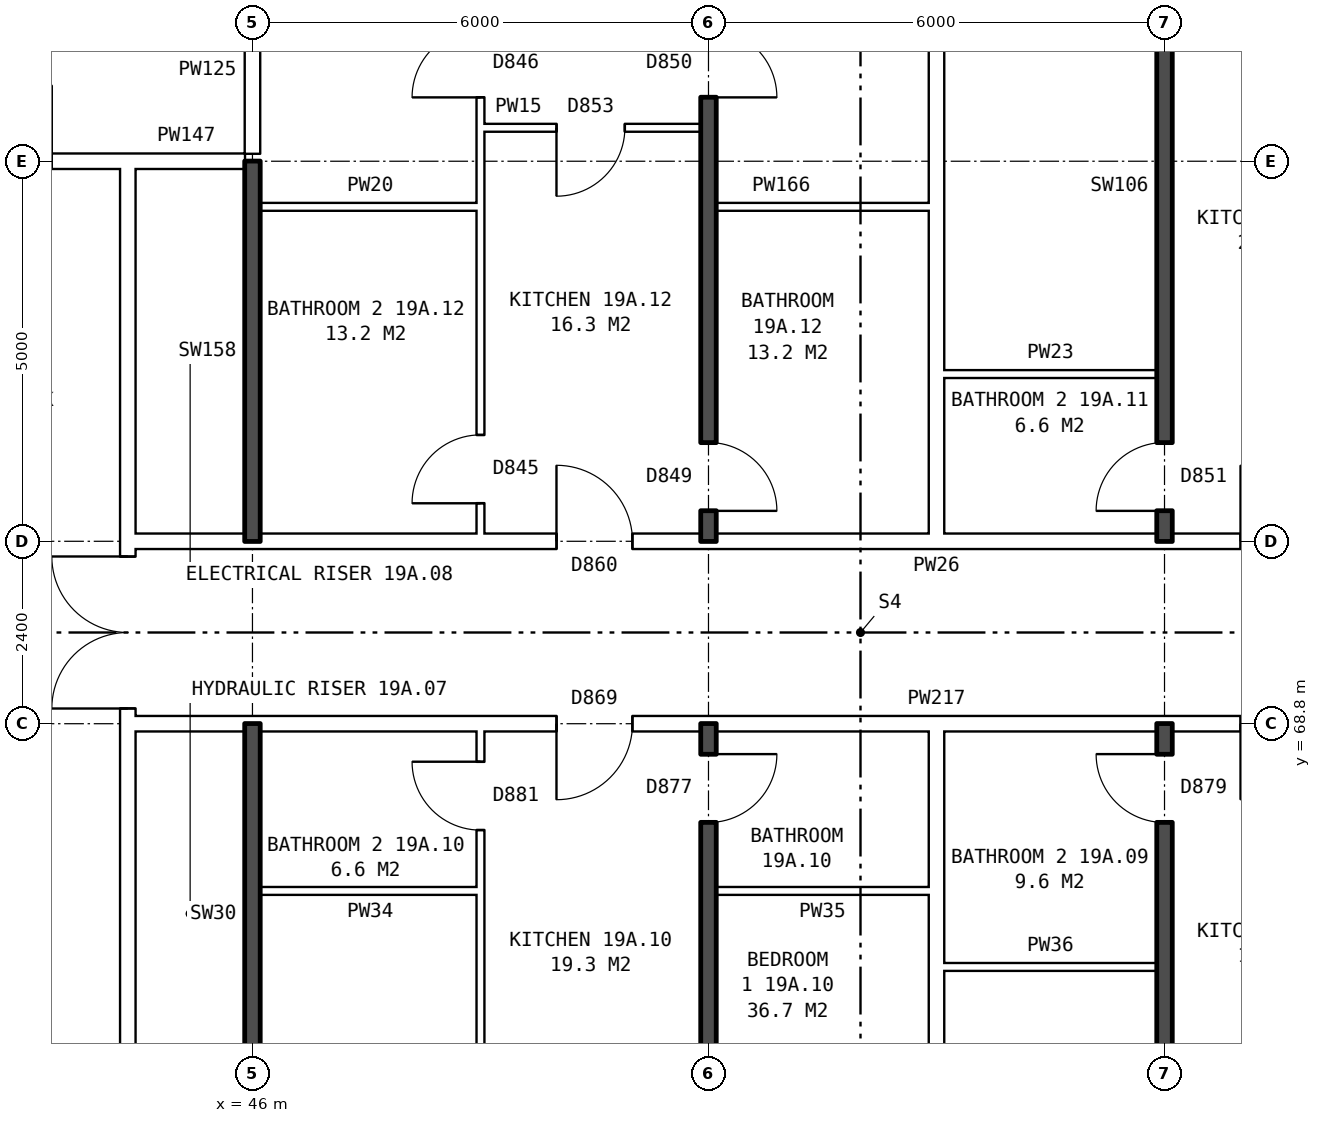
"""IFC4 building model, lengths in metres.
Left out: names, types, materials, properties, quantities, classifications, styles, units other than length and angle.
Written with IfcOpenShell. Run it as: python <this file> out.ifc"""

import sys

from ifc_helpers import new_model, si_unit, direction, frame, frame_2d, origin, place, context, subcontext, project, spatial, rectangle, extrude, element, fill, save


model = new_model("IFC4")
c1 = context("Model", 3, precision=1e-05, world=origin(), true_north=direction((0.0, 1.0)))
c2 = subcontext(c1, "Body", "Model", "MODEL_VIEW")
j1 = project(units=[si_unit("LENGTHUNIT", "METRE"), si_unit("PLANEANGLEUNIT", "RADIAN")], contexts=[c1])
p1 = place(None, origin())
s1 = spatial("IfcSite", under=j1, at=p1, CompositionType="ELEMENT")
p2 = place(p1, origin())
s2 = spatial("IfcBuilding", under=s1, at=p2, CompositionType="ELEMENT")
p3 = place(p2, frame((0.0, 0.0, 71.6)))
s3 = spatial("IfcBuildingStorey", under=s2, at=p3, CompositionType="ELEMENT", Elevation=71.6)
p4 = place(p3, frame((44.36, 63.9, 0.0), z_axis=(0.0, 0.0, 1.0), x_axis=(0.0, 1.0, 0.0)))
e1 = element("IfcWall", 1, at=p4, inside=s3, PredefinedType="PARTITIONING", context=c2, shape_type="SweptSolid", body=[
    extrude(rectangle(XDim=12.2, YDim=0.2, at=frame_2d((6.1, 0.0))), origin(), (0.0, 0.0, 1.0), 2.85),
])
p5 = place(p4, frame((5.1, 0.0, 0.0)))
e2 = element("IfcOpeningElement", 2, at=p5, cuts=e1, PredefinedType="OPENING", context=c2, shape_type="SweptSolid", body=[
    extrude(rectangle(XDim=2.0, YDim=2.1, at=frame_2d((1.0, 1.05))), frame((0.0, 0.11, 0.0), z_axis=(0.0, -1.0, 0.0), x_axis=(1.0, 0.0, 0.0)), (0.0, 0.0, 1.0), 0.22),
])
p6 = place(p3, frame((55.1, 65.6, 0.0), z_axis=(0.0, 0.0, 1.0), x_axis=(1.0, 0.0, 0.0)))
e3 = element("IfcWall", 3, at=p6, inside=s3, PredefinedType="PARTITIONING", context=c2, shape_type="SweptSolid", body=[
    extrude(rectangle(XDim=2.8, YDim=0.1, at=frame_2d((1.4, 0.0))), origin(), (0.0, 0.0, 1.0), 2.85),
])
p7 = place(p3, frame((46.1, 66.6, 0.0), z_axis=(0.0, 0.0, 1.0), x_axis=(1.0, 0.0, 0.0)))
e4 = element("IfcWall", 4, at=p7, inside=s3, PredefinedType="PARTITIONING", context=c2, shape_type="SweptSolid", body=[
    extrude(rectangle(XDim=2.9, YDim=0.1, at=frame_2d((1.45, 0.0))), origin(), (0.0, 0.0, 1.0), 2.85),
])
p8 = place(p3, frame((52.1, 66.6, 0.0), z_axis=(0.0, 0.0, 1.0), x_axis=(1.0, 0.0, 0.0)))
e5 = element("IfcWall", 5, at=p8, inside=s3, PredefinedType="PARTITIONING", context=c2, shape_type="SweptSolid", body=[
    extrude(rectangle(XDim=2.8, YDim=0.1, at=frame_2d((1.4, 0.0))), origin(), (0.0, 0.0, 1.0), 2.85),
])
p9 = place(p3, frame((44.36, 68.8, 0.0), z_axis=(0.0, 0.0, 1.0), x_axis=(1.0, 0.0, 0.0)))
e6 = element("IfcWall", 6, at=p9, inside=s3, PredefinedType="PARTITIONING", context=c2, shape_type="SweptSolid", body=[
    extrude(rectangle(XDim=19.28, YDim=0.2, at=frame_2d((9.64, 0.0))), origin(), (0.0, 0.0, 1.0), 2.85),
])
p10 = place(p9, frame((14.64, 0.0, 0.0)))
e7 = element("IfcOpeningElement", 7, at=p10, cuts=e6, PredefinedType="OPENING", context=c2, shape_type="SweptSolid", body=[
    extrude(rectangle(XDim=1.0, YDim=2.1, at=frame_2d((0.5, 1.05))), frame((0.0, 0.11, 0.0), z_axis=(0.0, -1.0, 0.0), x_axis=(1.0, 0.0, 0.0)), (0.0, 0.0, 1.0), 0.22),
])
p11 = place(p9, frame((5.64, 0.0, 0.0)))
e8 = element("IfcOpeningElement", 8, at=p11, cuts=e6, PredefinedType="OPENING", context=c2, shape_type="SweptSolid", body=[
    extrude(rectangle(XDim=1.0, YDim=2.1, at=frame_2d((0.5, 1.05))), frame((0.0, 0.11, 0.0), z_axis=(0.0, -1.0, 0.0), x_axis=(1.0, 0.0, 0.0)), (0.0, 0.0, 1.0), 0.22),
])
p12 = place(p3, frame((44.36, 71.2, 0.0), z_axis=(0.0, 0.0, 1.0), x_axis=(1.0, 0.0, 0.0)))
e9 = element("IfcWall", 9, at=p12, inside=s3, PredefinedType="PARTITIONING", context=c2, shape_type="SweptSolid", body=[
    extrude(rectangle(XDim=19.28, YDim=0.2, at=frame_2d((9.64, 0.0))), origin(), (0.0, 0.0, 1.0), 2.85),
])
p13 = place(p12, frame((14.64, 0.0, 0.0)))
e10 = element("IfcOpeningElement", 10, at=p13, cuts=e9, PredefinedType="OPENING", context=c2, shape_type="SweptSolid", body=[
    extrude(rectangle(XDim=1.0, YDim=2.1, at=frame_2d((0.5, 1.05))), frame((0.0, 0.11, 0.0), z_axis=(0.0, -1.0, 0.0), x_axis=(1.0, 0.0, 0.0)), (0.0, 0.0, 1.0), 0.22),
])
p14 = place(p12, frame((5.64, 0.0, 0.0)))
e11 = element("IfcOpeningElement", 11, at=p14, cuts=e9, PredefinedType="OPENING", context=c2, shape_type="SweptSolid", body=[
    extrude(rectangle(XDim=1.0, YDim=2.1, at=frame_2d((0.5, 1.05))), frame((0.0, 0.11, 0.0), z_axis=(0.0, -1.0, 0.0), x_axis=(1.0, 0.0, 0.0)), (0.0, 0.0, 1.0), 0.22),
])
p15 = place(p3, frame((55.1, 73.4, 0.0), z_axis=(0.0, 0.0, 1.0), x_axis=(1.0, 0.0, 0.0)))
e12 = element("IfcWall", 12, at=p15, inside=s3, PredefinedType="PARTITIONING", context=c2, shape_type="SweptSolid", body=[
    extrude(rectangle(XDim=2.8, YDim=0.1, at=frame_2d((1.4, 0.0))), origin(), (0.0, 0.0, 1.0), 2.85),
])
p16 = place(p3, frame((46.1, 75.6, 0.0), z_axis=(0.0, 0.0, 1.0), x_axis=(1.0, 0.0, 0.0)))
e13 = element("IfcWall", 13, at=p16, inside=s3, PredefinedType="PARTITIONING", context=c2, shape_type="SweptSolid", body=[
    extrude(rectangle(XDim=2.9, YDim=0.1, at=frame_2d((1.45, 0.0))), origin(), (0.0, 0.0, 1.0), 2.85),
])
p17 = place(p3, frame((52.1, 75.6, 0.0), z_axis=(0.0, 0.0, 1.0), x_axis=(1.0, 0.0, 0.0)))
e14 = element("IfcWall", 14, at=p17, inside=s3, PredefinedType="PARTITIONING", context=c2, shape_type="SweptSolid", body=[
    extrude(rectangle(XDim=2.8, YDim=0.1, at=frame_2d((1.4, 0.0))), origin(), (0.0, 0.0, 1.0), 2.85),
])
p18 = place(p3, frame((41.36, 76.2, 0.0), z_axis=(0.0, 0.0, 1.0), x_axis=(1.0, 0.0, 0.0)))
e15 = element("IfcWall", 15, at=p18, inside=s3, PredefinedType="PARTITIONING", context=c2, shape_type="SweptSolid", body=[
    extrude(rectangle(XDim=3.0, YDim=0.2, at=frame_2d((1.5, 0.0))), origin(), (0.0, 0.0, 1.0), 2.85),
])
p19 = place(p18, frame((1.0, 0.0, 0.0)))
e16 = element("IfcOpeningElement", 16, at=p19, cuts=e15, PredefinedType="OPENING", context=c2, shape_type="SweptSolid", body=[
    extrude(rectangle(XDim=1.0, YDim=2.1, at=frame_2d((0.5, 1.05))), frame((0.0, 0.11, 0.0), z_axis=(0.0, -1.0, 0.0), x_axis=(1.0, 0.0, 0.0)), (0.0, 0.0, 1.0), 0.22),
])
p20 = place(p3, frame((44.36, 76.2, 0.0), z_axis=(0.0, 0.0, 1.0), x_axis=(1.0, 0.0, 0.0)))
e17 = element("IfcWall", 17, at=p20, inside=s3, PredefinedType="PARTITIONING", context=c2, shape_type="SweptSolid", body=[
    extrude(rectangle(XDim=1.54, YDim=0.2, at=frame_2d((0.77, 0.0))), origin(), (0.0, 0.0, 1.0), 2.85),
])
p21 = place(p3, frame((49.0, 76.64, 0.0), z_axis=(0.0, 0.0, 1.0), x_axis=(1.0, 0.0, 0.0)))
e18 = element("IfcWall", 18, at=p21, inside=s3, PredefinedType="PARTITIONING", context=c2, shape_type="SweptSolid", body=[
    extrude(rectangle(XDim=2.9, YDim=0.1, at=frame_2d((1.45, 0.0))), origin(), (0.0, 0.0, 1.0), 2.85),
])
p22 = place(p21, frame((1.0, 0.0, 0.0)))
e19 = element("IfcOpeningElement", 19, at=p22, cuts=e18, PredefinedType="OPENING", context=c2, shape_type="SweptSolid", body=[
    extrude(rectangle(XDim=0.9, YDim=2.1, at=frame_2d((0.45, 1.05))), frame((0.0, 0.06, 0.0), z_axis=(0.0, -1.0, 0.0), x_axis=(1.0, 0.0, 0.0)), (0.0, 0.0, 1.0), 0.12),
])
for number, where, z_axis, x_axis in (
    (20, (46.0, 63.8, 0.0), (0.0, 0.0, 1.0), (0.0, 1.0, 0.0)),
    (21, (46.0, 71.2, 0.0), (0.0, 0.0, 1.0), (0.0, 1.0, 0.0)),
):
    element("IfcWall", number, at=place(p3, frame(where, z_axis=z_axis, x_axis=x_axis)), inside=s3, PredefinedType="SOLIDWALL", context=c2, shape_type="SweptSolid", body=[
        extrude(rectangle(XDim=5.0, YDim=0.2, at=frame_2d((2.5, 0.0))), origin(), (0.0, 0.0, 1.0), 2.85),
    ])
p23 = place(p3, frame((46.0, 76.3, 0.0), z_axis=(0.0, 0.0, 1.0), x_axis=(0.0, 1.0, 0.0)))
e22 = element("IfcWall", 22, at=p23, inside=s3, PredefinedType="PARTITIONING", context=c2, shape_type="SweptSolid", body=[
    extrude(rectangle(XDim=2.2, YDim=0.2, at=frame_2d((1.1, 0.0))), origin(), (0.0, 0.0, 1.0), 2.85),
])
p24 = place(p3, frame((49.0, 54.36, 0.0), z_axis=(0.0, 0.0, 1.0), x_axis=(0.0, 1.0, 0.0)))
e23 = element("IfcWall", 23, at=p24, inside=s3, PredefinedType="PARTITIONING", context=c2, shape_type="SweptSolid", body=[
    extrude(rectangle(XDim=14.34, YDim=0.1, at=frame_2d((7.17, 0.0))), origin(), (0.0, 0.0, 1.0), 2.85),
])
p25 = place(p24, frame((6.7, 0.0, 0.0)))
e24 = element("IfcOpeningElement", 24, at=p25, cuts=e23, PredefinedType="OPENING", context=c2, shape_type="SweptSolid", body=[
    extrude(rectangle(XDim=0.9, YDim=2.1, at=frame_2d((0.45, 1.05))), frame((0.0, 0.06, 0.0), z_axis=(0.0, -1.0, 0.0), x_axis=(1.0, 0.0, 0.0)), (0.0, 0.0, 1.0), 0.12),
])
p26 = place(p24, frame((13.04, 0.0, 0.0)))
e25 = element("IfcOpeningElement", 25, at=p26, cuts=e23, PredefinedType="OPENING", context=c2, shape_type="SweptSolid", body=[
    extrude(rectangle(XDim=0.9, YDim=2.1, at=frame_2d((0.45, 1.05))), frame((0.0, 0.06, 0.0), z_axis=(0.0, -1.0, 0.0), x_axis=(1.0, 0.0, 0.0)), (0.0, 0.0, 1.0), 0.12),
])
p27 = place(p3, frame((49.0, 71.3, 0.0), z_axis=(0.0, 0.0, 1.0), x_axis=(0.0, 1.0, 0.0)))
e26 = element("IfcWall", 26, at=p27, inside=s3, PredefinedType="PARTITIONING", context=c2, shape_type="SweptSolid", body=[
    extrude(rectangle(XDim=14.34, YDim=0.1, at=frame_2d((7.17, 0.0))), origin(), (0.0, 0.0, 1.0), 2.85),
])
p28 = place(p27, frame((5.74, 0.0, 0.0)))
e27 = element("IfcOpeningElement", 27, at=p28, cuts=e26, PredefinedType="OPENING", context=c2, shape_type="SweptSolid", body=[
    extrude(rectangle(XDim=0.9, YDim=2.1, at=frame_2d((0.45, 1.05))), frame((0.0, 0.06, 0.0), z_axis=(0.0, -1.0, 0.0), x_axis=(1.0, 0.0, 0.0)), (0.0, 0.0, 1.0), 0.12),
])
p29 = place(p27, frame((0.4, 0.0, 0.0)))
e28 = element("IfcOpeningElement", 28, at=p29, cuts=e26, PredefinedType="OPENING", context=c2, shape_type="SweptSolid", body=[
    extrude(rectangle(XDim=0.9, YDim=2.1, at=frame_2d((0.45, 1.05))), frame((0.0, 0.06, 0.0), z_axis=(0.0, -1.0, 0.0), x_axis=(1.0, 0.0, 0.0)), (0.0, 0.0, 1.0), 0.12),
])
p30 = place(p3, frame((52.0, 54.36, 0.0), z_axis=(0.0, 0.0, 1.0), x_axis=(0.0, 1.0, 0.0)))
e29 = element("IfcWall", 29, at=p30, inside=s3, PredefinedType="SOLIDWALL", context=c2, shape_type="SweptSolid", body=[
    extrude(rectangle(XDim=14.44, YDim=0.2, at=frame_2d((7.22, 0.0))), origin(), (0.0, 0.0, 1.0), 2.85),
])
p31 = place(p30, frame((6.7, 0.0, 0.0)))
e30 = element("IfcOpeningElement", 30, at=p31, cuts=e29, PredefinedType="OPENING", context=c2, shape_type="SweptSolid", body=[
    extrude(rectangle(XDim=0.9, YDim=2.1, at=frame_2d((0.45, 1.05))), frame((0.0, 0.11, 0.0), z_axis=(0.0, -1.0, 0.0), x_axis=(1.0, 0.0, 0.0)), (0.0, 0.0, 1.0), 0.22),
])
p32 = place(p30, frame((13.14, 0.0, 0.0)))
e31 = element("IfcOpeningElement", 31, at=p32, cuts=e29, PredefinedType="OPENING", context=c2, shape_type="SweptSolid", body=[
    extrude(rectangle(XDim=0.9, YDim=2.1, at=frame_2d((0.45, 1.05))), frame((0.0, 0.11, 0.0), z_axis=(0.0, -1.0, 0.0), x_axis=(1.0, 0.0, 0.0)), (0.0, 0.0, 1.0), 0.22),
])
p33 = place(p3, frame((52.0, 71.2, 0.0), z_axis=(0.0, 0.0, 1.0), x_axis=(0.0, 1.0, 0.0)))
e32 = element("IfcWall", 32, at=p33, inside=s3, PredefinedType="SOLIDWALL", context=c2, shape_type="SweptSolid", body=[
    extrude(rectangle(XDim=14.44, YDim=0.2, at=frame_2d((7.22, 0.0))), origin(), (0.0, 0.0, 1.0), 2.85),
])
p34 = place(p33, frame((5.84, 0.0, 0.0)))
e33 = element("IfcOpeningElement", 33, at=p34, cuts=e32, PredefinedType="OPENING", context=c2, shape_type="SweptSolid", body=[
    extrude(rectangle(XDim=0.9, YDim=2.1, at=frame_2d((0.45, 1.05))), frame((0.0, 0.11, 0.0), z_axis=(0.0, -1.0, 0.0), x_axis=(1.0, 0.0, 0.0)), (0.0, 0.0, 1.0), 0.22),
])
p35 = place(p33, frame((0.4, 0.0, 0.0)))
e34 = element("IfcOpeningElement", 34, at=p35, cuts=e32, PredefinedType="OPENING", context=c2, shape_type="SweptSolid", body=[
    extrude(rectangle(XDim=0.9, YDim=2.1, at=frame_2d((0.45, 1.05))), frame((0.0, 0.11, 0.0), z_axis=(0.0, -1.0, 0.0), x_axis=(1.0, 0.0, 0.0)), (0.0, 0.0, 1.0), 0.22),
])
for number, where, z_axis, x_axis in (
    (35, (55.0, 54.36, 0.0), (0.0, 0.0, 1.0), (0.0, 1.0, 0.0)),
    (36, (55.0, 71.3, 0.0), (0.0, 0.0, 1.0), (0.0, 1.0, 0.0)),
):
    element("IfcWall", number, at=place(p3, frame(where, z_axis=z_axis, x_axis=x_axis)), inside=s3, PredefinedType="PARTITIONING", context=c2, shape_type="SweptSolid", body=[
        extrude(rectangle(XDim=14.34, YDim=0.2, at=frame_2d((7.17, 0.0))), origin(), (0.0, 0.0, 1.0), 2.85),
    ])
p36 = place(p3, frame((58.0, 54.36, 0.0), z_axis=(0.0, 0.0, 1.0), x_axis=(0.0, 1.0, 0.0)))
e37 = element("IfcWall", 37, at=p36, inside=s3, PredefinedType="SOLIDWALL", context=c2, shape_type="SweptSolid", body=[
    extrude(rectangle(XDim=14.44, YDim=0.2, at=frame_2d((7.22, 0.0))), origin(), (0.0, 0.0, 1.0), 2.85),
])
p37 = place(p36, frame((7.7, 0.0, 0.0)))
e38 = element("IfcOpeningElement", 38, at=p37, cuts=e37, PredefinedType="OPENING", context=c2, shape_type="SweptSolid", body=[
    extrude(rectangle(XDim=0.9, YDim=2.1, at=frame_2d((0.45, 1.05))), frame((0.0, 0.11, 0.0), z_axis=(0.0, -1.0, 0.0), x_axis=(1.0, 0.0, 0.0)), (0.0, 0.0, 1.0), 0.22),
])
p38 = place(p36, frame((13.14, 0.0, 0.0)))
e39 = element("IfcOpeningElement", 39, at=p38, cuts=e37, PredefinedType="OPENING", context=c2, shape_type="SweptSolid", body=[
    extrude(rectangle(XDim=0.9, YDim=2.1, at=frame_2d((0.45, 1.05))), frame((0.0, 0.11, 0.0), z_axis=(0.0, -1.0, 0.0), x_axis=(1.0, 0.0, 0.0)), (0.0, 0.0, 1.0), 0.22),
])
p39 = place(p3, frame((58.0, 71.2, 0.0), z_axis=(0.0, 0.0, 1.0), x_axis=(0.0, 1.0, 0.0)))
e40 = element("IfcWall", 40, at=p39, inside=s3, PredefinedType="SOLIDWALL", context=c2, shape_type="SweptSolid", body=[
    extrude(rectangle(XDim=14.44, YDim=0.2, at=frame_2d((7.22, 0.0))), origin(), (0.0, 0.0, 1.0), 2.85),
])
p40 = place(p39, frame((8.04, 0.0, 0.0)))
e41 = element("IfcOpeningElement", 41, at=p40, cuts=e40, PredefinedType="OPENING", context=c2, shape_type="SweptSolid", body=[
    extrude(rectangle(XDim=0.9, YDim=2.1, at=frame_2d((0.45, 1.05))), frame((0.0, 0.11, 0.0), z_axis=(0.0, -1.0, 0.0), x_axis=(1.0, 0.0, 0.0)), (0.0, 0.0, 1.0), 0.22),
])
p41 = place(p39, frame((0.4, 0.0, 0.0)))
e42 = element("IfcOpeningElement", 42, at=p41, cuts=e40, PredefinedType="OPENING", context=c2, shape_type="SweptSolid", body=[
    extrude(rectangle(XDim=0.9, YDim=2.1, at=frame_2d((0.45, 1.05))), frame((0.0, 0.11, 0.0), z_axis=(0.0, -1.0, 0.0), x_axis=(1.0, 0.0, 0.0)), (0.0, 0.0, 1.0), 0.22),
])
p42 = place(p5, origin())
e43 = element("IfcDoor", 43, at=p42, inside=s3, OperationType="DOUBLE_DOOR_SINGLE_SWING", PredefinedType="DOOR", context=c2, shape_type="SweptSolid", body=[
    extrude(rectangle(XDim=2.0, YDim=2.1, at=frame_2d((1.0, 1.05))), frame((0.0, 0.025, 0.0), z_axis=(0.0, -1.0, 0.0), x_axis=(1.0, 0.0, 0.0)), (0.0, 0.0, 1.0), 0.05),
])
fill(e2, e43)
p43 = place(p38, origin())
e44 = element("IfcDoor", 44, at=p43, inside=s3, OperationType="SINGLE_SWING_RIGHT", PredefinedType="DOOR", context=c2, shape_type="SweptSolid", body=[
    extrude(rectangle(XDim=0.9, YDim=2.1, at=frame_2d((0.45, 1.05))), frame((0.0, 0.025, 0.0), z_axis=(0.0, -1.0, 0.0), x_axis=(1.0, 0.0, 0.0)), (0.0, 0.0, 1.0), 0.05),
])
fill(e39, e44)
p44 = place(p11, frame((1.0, 0.0, 0.0), z_axis=(0.0, 0.0, 1.0), x_axis=(-1.0, 0.0, 0.0)))
e45 = element("IfcDoor", 45, at=p44, inside=s3, OperationType="SINGLE_SWING_RIGHT", PredefinedType="DOOR", context=c2, shape_type="SweptSolid", body=[
    extrude(rectangle(XDim=1.0, YDim=2.1, at=frame_2d((0.5, 1.05))), frame((0.0, 0.025, 0.0), z_axis=(0.0, -1.0, 0.0), x_axis=(1.0, 0.0, 0.0)), (0.0, 0.0, 1.0), 0.05),
])
fill(e8, e45)
p45 = place(p32, frame((0.9, 0.0, 0.0), z_axis=(0.0, 0.0, 1.0), x_axis=(-1.0, 0.0, 0.0)))
e46 = element("IfcDoor", 46, at=p45, inside=s3, OperationType="SINGLE_SWING_LEFT", PredefinedType="DOOR", context=c2, shape_type="SweptSolid", body=[
    extrude(rectangle(XDim=0.9, YDim=2.1, at=frame_2d((0.45, 1.05))), frame((0.0, 0.025, 0.0), z_axis=(0.0, -1.0, 0.0), x_axis=(1.0, 0.0, 0.0)), (0.0, 0.0, 1.0), 0.05),
])
fill(e31, e46)
p46 = place(p26, origin())
e47 = element("IfcDoor", 47, at=p46, inside=s3, OperationType="SINGLE_SWING_RIGHT", PredefinedType="DOOR", context=c2, shape_type="SweptSolid", body=[
    extrude(rectangle(XDim=0.9, YDim=2.1, at=frame_2d((0.45, 1.05))), frame((0.0, 0.025, 0.0), z_axis=(0.0, -1.0, 0.0), x_axis=(1.0, 0.0, 0.0)), (0.0, 0.0, 1.0), 0.05),
])
fill(e25, e47)
p47 = place(p41, origin())
e48 = element("IfcDoor", 48, at=p47, inside=s3, OperationType="SINGLE_SWING_LEFT", PredefinedType="DOOR", context=c2, shape_type="SweptSolid", body=[
    extrude(rectangle(XDim=0.9, YDim=2.1, at=frame_2d((0.45, 1.05))), frame((0.0, 0.025, 0.0), z_axis=(0.0, -1.0, 0.0), x_axis=(1.0, 0.0, 0.0)), (0.0, 0.0, 1.0), 0.05),
])
fill(e42, e48)
p48 = place(p34, frame((0.9, 0.0, 0.0), z_axis=(0.0, 0.0, 1.0), x_axis=(-1.0, 0.0, 0.0)))
e49 = element("IfcDoor", 49, at=p48, inside=s3, OperationType="SINGLE_SWING_RIGHT", PredefinedType="DOOR", context=c2, shape_type="SweptSolid", body=[
    extrude(rectangle(XDim=0.9, YDim=2.1, at=frame_2d((0.45, 1.05))), frame((0.0, 0.025, 0.0), z_axis=(0.0, -1.0, 0.0), x_axis=(1.0, 0.0, 0.0)), (0.0, 0.0, 1.0), 0.05),
])
fill(e33, e49)
p49 = place(p28, origin())
e50 = element("IfcDoor", 50, at=p49, inside=s3, OperationType="SINGLE_SWING_LEFT", PredefinedType="DOOR", context=c2, shape_type="SweptSolid", body=[
    extrude(rectangle(XDim=0.9, YDim=2.1, at=frame_2d((0.45, 1.05))), frame((0.0, 0.025, 0.0), z_axis=(0.0, -1.0, 0.0), x_axis=(1.0, 0.0, 0.0)), (0.0, 0.0, 1.0), 0.05),
])
fill(e27, e50)
p50 = place(p14, origin())
e51 = element("IfcDoor", 51, at=p50, inside=s3, OperationType="SINGLE_SWING_LEFT", PredefinedType="DOOR", context=c2, shape_type="SweptSolid", body=[
    extrude(rectangle(XDim=1.0, YDim=2.1, at=frame_2d((0.5, 1.05))), frame((0.0, 0.025, 0.0), z_axis=(0.0, -1.0, 0.0), x_axis=(1.0, 0.0, 0.0)), (0.0, 0.0, 1.0), 0.05),
])
fill(e11, e51)
p51 = place(p22, frame((0.9, 0.0, 0.0), z_axis=(0.0, 0.0, 1.0), x_axis=(-1.0, 0.0, 0.0)))
e52 = element("IfcDoor", 52, at=p51, inside=s3, OperationType="SINGLE_SWING_RIGHT", PredefinedType="DOOR", context=c2, shape_type="SweptSolid", body=[
    extrude(rectangle(XDim=0.9, YDim=2.1, at=frame_2d((0.45, 1.05))), frame((0.0, 0.025, 0.0), z_axis=(0.0, -1.0, 0.0), x_axis=(1.0, 0.0, 0.0)), (0.0, 0.0, 1.0), 0.05),
])
fill(e19, e52)
p52 = place(p35, frame((0.9, 0.0, 0.0), z_axis=(0.0, 0.0, 1.0), x_axis=(-1.0, 0.0, 0.0)))
e53 = element("IfcDoor", 53, at=p52, inside=s3, OperationType="SINGLE_SWING_RIGHT", PredefinedType="DOOR", context=c2, shape_type="SweptSolid", body=[
    extrude(rectangle(XDim=0.9, YDim=2.1, at=frame_2d((0.45, 1.05))), frame((0.0, 0.025, 0.0), z_axis=(0.0, -1.0, 0.0), x_axis=(1.0, 0.0, 0.0)), (0.0, 0.0, 1.0), 0.05),
])
fill(e34, e53)
p53 = place(p29, origin())
e54 = element("IfcDoor", 54, at=p53, inside=s3, OperationType="SINGLE_SWING_LEFT", PredefinedType="DOOR", context=c2, shape_type="SweptSolid", body=[
    extrude(rectangle(XDim=0.9, YDim=2.1, at=frame_2d((0.45, 1.05))), frame((0.0, 0.025, 0.0), z_axis=(0.0, -1.0, 0.0), x_axis=(1.0, 0.0, 0.0)), (0.0, 0.0, 1.0), 0.05),
])
fill(e28, e54)
save(model, sys.argv[1])
